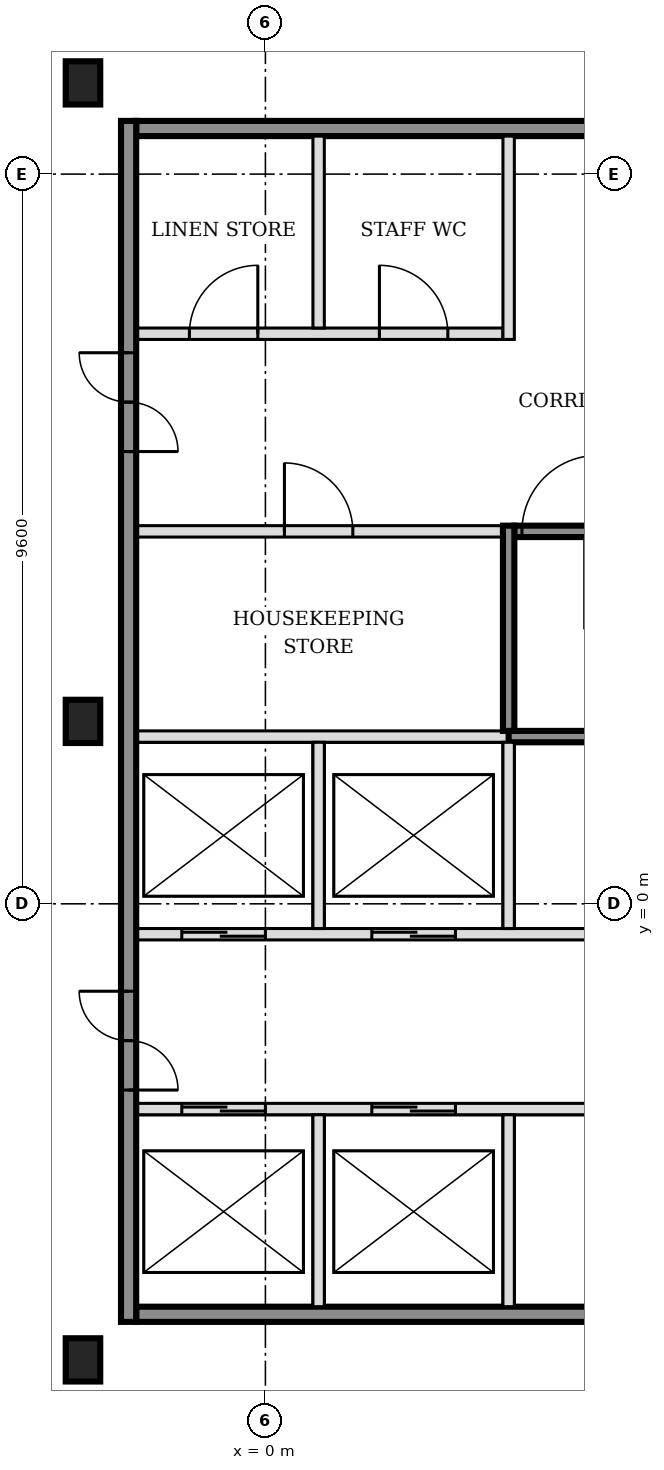
"""IFC4 building model, lengths in metres.
Left out: names, types, materials, properties, quantities, classifications, styles, units other than length and angle.
Written with IfcOpenShell. Run it as: python <this file> out.ifc"""

import sys

from ifc_helpers import new_model, si_unit, direction, frame, frame_2d, origin, origin_2d, place, context, subcontext, project, spatial, rectangle, i_section, extrude, element, fill, save


model = new_model("IFC4")
c1 = context("Model", 3, precision=1e-05, world=origin(), true_north=direction((0.0, 1.0)))
c2 = subcontext(c1, "Body", "Model", "MODEL_VIEW")
j1 = project(units=[si_unit("LENGTHUNIT", "METRE"), si_unit("PLANEANGLEUNIT", "RADIAN")], contexts=[c1])
p1 = place(None, origin())
s1 = spatial("IfcSite", under=j1, at=p1, CompositionType="ELEMENT")
p2 = place(p1, origin())
s2 = spatial("IfcBuilding", under=s1, at=p2, CompositionType="ELEMENT")
p3 = place(p2, frame((0.0, 0.0, 43.8)))
s3 = spatial("IfcBuildingStorey", under=s2, at=p3, CompositionType="ELEMENT", Elevation=43.8)
for number, where, z_axis, x_axis in (
    (1, (-2.4, -6.0, -0.15), (0.0, 0.0, 1.0), (1.0, 0.0, 0.0)),
    (2, (-2.4, 2.4, -0.15), (0.0, 0.0, 1.0), (1.0, 0.0, 0.0)),
    (3, (-2.4, 10.8, -0.15), (0.0, 0.0, 1.0), (1.0, 0.0, 0.0)),
):
    element("IfcColumn", number, at=place(p3, frame(where, z_axis=z_axis, x_axis=x_axis)), inside=s3, PredefinedType="COLUMN", context=c2, shape_type="SweptSolid", body=[
        extrude(i_section(OverallWidth=0.454, OverallDepth=0.569, WebThickness=0.078, FlangeThickness=0.125, FilletRadius=0.015, at=origin_2d()), origin(), (0.0, 0.0, 1.0), 3.6),
    ])
p4 = place(p3, frame((-1.7, -5.4, 0.0), z_axis=(0.0, 0.0, 1.0), x_axis=(1.0, 0.0, 0.0)))
e4 = element("IfcWall", 4, at=p4, inside=s3, PredefinedType="SOLIDWALL", context=c2, shape_type="SweptSolid", body=[
    extrude(rectangle(XDim=7.9, YDim=0.2, at=frame_2d((3.95, 0.0))), origin(), (0.0, 0.0, 1.0), 3.45),
])
p5 = place(p3, frame((-1.7, -2.7, 0.0), z_axis=(0.0, 0.0, 1.0), x_axis=(1.0, 0.0, 0.0)))
e5 = element("IfcWall", 5, at=p5, inside=s3, PredefinedType="SOLIDWALL", context=c2, shape_type="SweptSolid", body=[
    extrude(rectangle(XDim=7.9, YDim=0.15, at=frame_2d((3.95, 0.0))), origin(), (0.0, 0.0, 1.0), 3.45),
])
p6 = place(p5, frame((0.6, 0.0, 0.0)))
e6 = element("IfcOpeningElement", 6, at=p6, cuts=e5, PredefinedType="OPENING", context=c2, shape_type="SweptSolid", body=[
    extrude(rectangle(XDim=1.1, YDim=2.1, at=frame_2d((0.55, 1.05))), frame((0.0, 0.085, 0.0), z_axis=(0.0, -1.0, 0.0), x_axis=(1.0, 0.0, 0.0)), (0.0, 0.0, 1.0), 0.17),
])
p7 = place(p5, frame((3.1, 0.0, 0.0)))
e7 = element("IfcOpeningElement", 7, at=p7, cuts=e5, PredefinedType="OPENING", context=c2, shape_type="SweptSolid", body=[
    extrude(rectangle(XDim=1.1, YDim=2.1, at=frame_2d((0.55, 1.05))), frame((0.0, 0.085, 0.0), z_axis=(0.0, -1.0, 0.0), x_axis=(1.0, 0.0, 0.0)), (0.0, 0.0, 1.0), 0.17),
])
p8 = place(p3, frame((-1.7, -0.4, 0.0), z_axis=(0.0, 0.0, 1.0), x_axis=(1.0, 0.0, 0.0)))
e8 = element("IfcWall", 8, at=p8, inside=s3, PredefinedType="SOLIDWALL", context=c2, shape_type="SweptSolid", body=[
    extrude(rectangle(XDim=15.925, YDim=0.15, at=frame_2d((7.962, 0.0))), origin(), (0.0, 0.0, 1.0), 3.45),
])
p9 = place(p8, frame((0.6, 0.0, 0.0)))
e9 = element("IfcOpeningElement", 9, at=p9, cuts=e8, PredefinedType="OPENING", context=c2, shape_type="SweptSolid", body=[
    extrude(rectangle(XDim=1.1, YDim=2.1, at=frame_2d((0.55, 1.05))), frame((0.0, 0.085, 0.0), z_axis=(0.0, -1.0, 0.0), x_axis=(1.0, 0.0, 0.0)), (0.0, 0.0, 1.0), 0.17),
])
p10 = place(p8, frame((3.1, 0.0, 0.0)))
e10 = element("IfcOpeningElement", 10, at=p10, cuts=e8, PredefinedType="OPENING", context=c2, shape_type="SweptSolid", body=[
    extrude(rectangle(XDim=1.1, YDim=2.1, at=frame_2d((0.55, 1.05))), frame((0.0, 0.085, 0.0), z_axis=(0.0, -1.0, 0.0), x_axis=(1.0, 0.0, 0.0)), (0.0, 0.0, 1.0), 0.17),
])
p11 = place(p8, frame((11.575, 0.0, 0.0)))
e11 = element("IfcOpeningElement", 11, at=p11, cuts=e8, PredefinedType="OPENING", context=c2, shape_type="SweptSolid", body=[
    extrude(rectangle(XDim=1.2, YDim=2.1, at=frame_2d((0.6, 1.05))), frame((0.0, 0.085, 0.0), z_axis=(0.0, -1.0, 0.0), x_axis=(1.0, 0.0, 0.0)), (0.0, 0.0, 1.0), 0.17),
])
p12 = place(p8, frame((14.125, 0.0, 0.0)))
e12 = element("IfcOpeningElement", 12, at=p12, cuts=e8, PredefinedType="OPENING", context=c2, shape_type="SweptSolid", body=[
    extrude(rectangle(XDim=1.2, YDim=2.1, at=frame_2d((0.6, 1.05))), frame((0.0, 0.085, 0.0), z_axis=(0.0, -1.0, 0.0), x_axis=(1.0, 0.0, 0.0)), (0.0, 0.0, 1.0), 0.17),
])
p13 = place(p3, frame((-1.7, 2.2, 0.0), z_axis=(0.0, 0.0, 1.0), x_axis=(1.0, 0.0, 0.0)))
e13 = element("IfcWall", 13, at=p13, inside=s3, PredefinedType="SOLIDWALL", context=c2, shape_type="SweptSolid", body=[
    extrude(rectangle(XDim=4.9, YDim=0.15, at=frame_2d((2.45, 0.0))), origin(), (0.0, 0.0, 1.0), 3.45),
])
p14 = place(p3, frame((3.2, 2.2, 0.0), z_axis=(0.0, 0.0, 1.0), x_axis=(1.0, 0.0, 0.0)))
e14 = element("IfcWall", 14, at=p14, inside=s3, PredefinedType="SOLIDWALL", context=c2, shape_type="SweptSolid", body=[
    extrude(rectangle(XDim=6.5, YDim=0.15, at=frame_2d((3.25, 0.0))), origin(), (0.0, 0.0, 1.0), 3.45),
])
p15 = place(p3, frame((-1.7, 4.9, 0.0), z_axis=(0.0, 0.0, 1.0), x_axis=(1.0, 0.0, 0.0)))
e15 = element("IfcWall", 15, at=p15, inside=s3, PredefinedType="PARTITIONING", context=c2, shape_type="SweptSolid", body=[
    extrude(rectangle(XDim=4.825, YDim=0.15, at=frame_2d((2.413, 0.0))), origin(), (0.0, 0.0, 1.0), 3.45),
])
p16 = place(p15, frame((1.95, 0.0, 0.0)))
e16 = element("IfcOpeningElement", 16, at=p16, cuts=e15, PredefinedType="OPENING", context=c2, shape_type="SweptSolid", body=[
    extrude(rectangle(XDim=0.9, YDim=2.1, at=frame_2d((0.45, 1.05))), frame((0.0, 0.085, 0.0), z_axis=(0.0, -1.0, 0.0), x_axis=(1.0, 0.0, 0.0)), (0.0, 0.0, 1.0), 0.17),
])
p17 = place(p3, frame((3.275, 4.9, 0.0), z_axis=(0.0, 0.0, 1.0), x_axis=(1.0, 0.0, 0.0)))
e17 = element("IfcWall", 17, at=p17, inside=s3, PredefinedType="SOLIDWALL", context=c2, shape_type="SweptSolid", body=[
    extrude(rectangle(XDim=6.425, YDim=0.15, at=frame_2d((3.212, 0.0))), origin(), (0.0, 0.0, 1.0), 3.45),
])
p18 = place(p17, frame((0.1, 0.0, 0.0)))
e18 = element("IfcOpeningElement", 18, at=p18, cuts=e17, PredefinedType="OPENING", context=c2, shape_type="SweptSolid", body=[
    extrude(rectangle(XDim=1.0, YDim=2.1, at=frame_2d((0.5, 1.05))), frame((0.0, 0.085, 0.0), z_axis=(0.0, -1.0, 0.0), x_axis=(1.0, 0.0, 0.0)), (0.0, 0.0, 1.0), 0.17),
])
p19 = place(p3, frame((-1.7, 7.5, 0.0), z_axis=(0.0, 0.0, 1.0), x_axis=(1.0, 0.0, 0.0)))
e19 = element("IfcWall", 19, at=p19, inside=s3, PredefinedType="PARTITIONING", context=c2, shape_type="SweptSolid", body=[
    extrude(rectangle(XDim=4.825, YDim=0.15, at=frame_2d((2.413, 0.0))), origin(), (0.0, 0.0, 1.0), 3.45),
])
p20 = place(p19, frame((0.7, 0.0, 0.0)))
e20 = element("IfcOpeningElement", 20, at=p20, cuts=e19, PredefinedType="OPENING", context=c2, shape_type="SweptSolid", body=[
    extrude(rectangle(XDim=0.9, YDim=2.1, at=frame_2d((0.45, 1.05))), frame((0.0, 0.085, 0.0), z_axis=(0.0, -1.0, 0.0), x_axis=(1.0, 0.0, 0.0)), (0.0, 0.0, 1.0), 0.17),
])
p21 = place(p19, frame((3.2, 0.0, 0.0)))
e21 = element("IfcOpeningElement", 21, at=p21, cuts=e19, PredefinedType="OPENING", context=c2, shape_type="SweptSolid", body=[
    extrude(rectangle(XDim=0.9, YDim=2.1, at=frame_2d((0.45, 1.05))), frame((0.0, 0.085, 0.0), z_axis=(0.0, -1.0, 0.0), x_axis=(1.0, 0.0, 0.0)), (0.0, 0.0, 1.0), 0.17),
])
p22 = place(p3, frame((-1.7, 10.2, 0.0), z_axis=(0.0, 0.0, 1.0), x_axis=(1.0, 0.0, 0.0)))
e22 = element("IfcWall", 22, at=p22, inside=s3, PredefinedType="SOLIDWALL", context=c2, shape_type="SweptSolid", body=[
    extrude(rectangle(XDim=7.9, YDim=0.2, at=frame_2d((3.95, 0.0))), origin(), (0.0, 0.0, 1.0), 3.45),
])
p23 = place(p3, frame((-1.8, -5.5, 0.0), z_axis=(0.0, 0.0, 1.0), x_axis=(0.0, 1.0, 0.0)))
e23 = element("IfcWall", 23, at=p23, inside=s3, PredefinedType="SOLIDWALL", context=c2, shape_type="SweptSolid", body=[
    extrude(rectangle(XDim=15.8, YDim=0.2, at=frame_2d((7.9, 0.0))), origin(), (0.0, 0.0, 1.0), 3.45),
])
p24 = place(p23, frame((3.05, 0.0, 0.0)))
e24 = element("IfcOpeningElement", 24, at=p24, cuts=e23, PredefinedType="OPENING", context=c2, shape_type="SweptSolid", body=[
    extrude(rectangle(XDim=1.3, YDim=2.1, at=frame_2d((0.65, 1.05))), frame((0.0, 0.11, 0.0), z_axis=(0.0, -1.0, 0.0), x_axis=(1.0, 0.0, 0.0)), (0.0, 0.0, 1.0), 0.22),
])
p25 = place(p23, frame((11.45, 0.0, 0.0)))
e25 = element("IfcOpeningElement", 25, at=p25, cuts=e23, PredefinedType="OPENING", context=c2, shape_type="SweptSolid", body=[
    extrude(rectangle(XDim=1.3, YDim=2.1, at=frame_2d((0.65, 1.05))), frame((0.0, 0.11, 0.0), z_axis=(0.0, -1.0, 0.0), x_axis=(1.0, 0.0, 0.0)), (0.0, 0.0, 1.0), 0.22),
])
p26 = place(p3, frame((0.7, -5.3, 0.0), z_axis=(0.0, 0.0, 1.0), x_axis=(0.0, 1.0, 0.0)))
e26 = element("IfcWall", 26, at=p26, inside=s3, PredefinedType="SOLIDWALL", context=c2, shape_type="SweptSolid", body=[
    extrude(rectangle(XDim=2.525, YDim=0.15, at=frame_2d((1.263, 0.0))), origin(), (0.0, 0.0, 1.0), 3.45),
])
p27 = place(p3, frame((0.7, -0.325, 0.0), z_axis=(0.0, 0.0, 1.0), x_axis=(0.0, 1.0, 0.0)))
e27 = element("IfcWall", 27, at=p27, inside=s3, PredefinedType="SOLIDWALL", context=c2, shape_type="SweptSolid", body=[
    extrude(rectangle(XDim=2.45, YDim=0.15, at=frame_2d((1.225, 0.0))), origin(), (0.0, 0.0, 1.0), 3.45),
])
p28 = place(p3, frame((0.7, 7.575, 0.0), z_axis=(0.0, 0.0, 1.0), x_axis=(0.0, 1.0, 0.0)))
e28 = element("IfcWall", 28, at=p28, inside=s3, PredefinedType="PARTITIONING", context=c2, shape_type="SweptSolid", body=[
    extrude(rectangle(XDim=2.525, YDim=0.15, at=frame_2d((1.263, 0.0))), origin(), (0.0, 0.0, 1.0), 3.45),
])
p29 = place(p3, frame((3.2, -5.3, 0.0), z_axis=(0.0, 0.0, 1.0), x_axis=(0.0, 1.0, 0.0)))
e29 = element("IfcWall", 29, at=p29, inside=s3, PredefinedType="SOLIDWALL", context=c2, shape_type="SweptSolid", body=[
    extrude(rectangle(XDim=2.525, YDim=0.15, at=frame_2d((1.263, 0.0))), origin(), (0.0, 0.0, 1.0), 3.45),
])
p30 = place(p3, frame((3.2, -0.325, 0.0), z_axis=(0.0, 0.0, 1.0), x_axis=(0.0, 1.0, 0.0)))
e30 = element("IfcWall", 30, at=p30, inside=s3, PredefinedType="SOLIDWALL", context=c2, shape_type="SweptSolid", body=[
    extrude(rectangle(XDim=2.45, YDim=0.15, at=frame_2d((1.225, 0.0))), origin(), (0.0, 0.0, 1.0), 3.45),
])
p31 = place(p3, frame((3.2, 2.275, 0.0), z_axis=(0.0, 0.0, 1.0), x_axis=(0.0, 1.0, 0.0)))
e31 = element("IfcWall", 31, at=p31, inside=s3, PredefinedType="SOLIDWALL", context=c2, shape_type="SweptSolid", body=[
    extrude(rectangle(XDim=2.7, YDim=0.15, at=frame_2d((1.35, 0.0))), origin(), (0.0, 0.0, 1.0), 3.45),
])
p32 = place(p3, frame((3.2, 7.425, 0.0), z_axis=(0.0, 0.0, 1.0), x_axis=(0.0, 1.0, 0.0)))
e32 = element("IfcWall", 32, at=p32, inside=s3, PredefinedType="PARTITIONING", context=c2, shape_type="SweptSolid", body=[
    extrude(rectangle(XDim=2.675, YDim=0.15, at=frame_2d((1.337, 0.0))), origin(), (0.0, 0.0, 1.0), 3.45),
])
p33 = place(p6, origin())
e33 = element("IfcDoor", 33, at=p33, inside=s3, OperationType="DOUBLE_DOOR_SLIDING", PredefinedType="DOOR", context=c2, shape_type="SweptSolid", body=[
    extrude(rectangle(XDim=1.1, YDim=2.1, at=frame_2d((0.55, 1.05))), frame((0.0, 0.025, 0.0), z_axis=(0.0, -1.0, 0.0), x_axis=(1.0, 0.0, 0.0)), (0.0, 0.0, 1.0), 0.05),
])
fill(e6, e33)
p34 = place(p7, origin())
e34 = element("IfcDoor", 34, at=p34, inside=s3, OperationType="DOUBLE_DOOR_SLIDING", PredefinedType="DOOR", context=c2, shape_type="SweptSolid", body=[
    extrude(rectangle(XDim=1.1, YDim=2.1, at=frame_2d((0.55, 1.05))), frame((0.0, 0.025, 0.0), z_axis=(0.0, -1.0, 0.0), x_axis=(1.0, 0.0, 0.0)), (0.0, 0.0, 1.0), 0.05),
])
fill(e7, e34)
p35 = place(p9, origin())
e35 = element("IfcDoor", 35, at=p35, inside=s3, OperationType="DOUBLE_DOOR_SLIDING", PredefinedType="DOOR", context=c2, shape_type="SweptSolid", body=[
    extrude(rectangle(XDim=1.1, YDim=2.1, at=frame_2d((0.55, 1.05))), frame((0.0, 0.025, 0.0), z_axis=(0.0, -1.0, 0.0), x_axis=(1.0, 0.0, 0.0)), (0.0, 0.0, 1.0), 0.05),
])
fill(e9, e35)
p36 = place(p10, origin())
e36 = element("IfcDoor", 36, at=p36, inside=s3, OperationType="DOUBLE_DOOR_SLIDING", PredefinedType="DOOR", context=c2, shape_type="SweptSolid", body=[
    extrude(rectangle(XDim=1.1, YDim=2.1, at=frame_2d((0.55, 1.05))), frame((0.0, 0.025, 0.0), z_axis=(0.0, -1.0, 0.0), x_axis=(1.0, 0.0, 0.0)), (0.0, 0.0, 1.0), 0.05),
])
fill(e10, e36)
p37 = place(p18, origin())
e37 = element("IfcDoor", 37, at=p37, inside=s3, OperationType="SINGLE_SWING_RIGHT", PredefinedType="DOOR", context=c2, shape_type="SweptSolid", body=[
    extrude(rectangle(XDim=1.0, YDim=2.1, at=frame_2d((0.5, 1.05))), frame((0.0, 0.025, 0.0), z_axis=(0.0, -1.0, 0.0), x_axis=(1.0, 0.0, 0.0)), (0.0, 0.0, 1.0), 0.05),
])
fill(e18, e37)
p38 = place(p24, origin())
e38 = element("IfcDoor", 38, at=p38, inside=s3, OperationType="DOUBLE_DOOR_SINGLE_SWING", PredefinedType="DOOR", context=c2, shape_type="SweptSolid", body=[
    extrude(rectangle(XDim=1.3, YDim=2.1, at=frame_2d((0.65, 1.05))), frame((0.0, 0.025, 0.0), z_axis=(0.0, -1.0, 0.0), x_axis=(1.0, 0.0, 0.0)), (0.0, 0.0, 1.0), 0.05),
])
fill(e24, e38)
p39 = place(p25, origin())
e39 = element("IfcDoor", 39, at=p39, inside=s3, OperationType="DOUBLE_DOOR_SINGLE_SWING", PredefinedType="DOOR", context=c2, shape_type="SweptSolid", body=[
    extrude(rectangle(XDim=1.3, YDim=2.1, at=frame_2d((0.65, 1.05))), frame((0.0, 0.025, 0.0), z_axis=(0.0, -1.0, 0.0), x_axis=(1.0, 0.0, 0.0)), (0.0, 0.0, 1.0), 0.05),
])
fill(e25, e39)
p40 = place(p16, origin())
e40 = element("IfcDoor", 40, at=p40, inside=s3, OperationType="SINGLE_SWING_LEFT", PredefinedType="DOOR", context=c2, shape_type="SweptSolid", body=[
    extrude(rectangle(XDim=0.9, YDim=2.1, at=frame_2d((0.45, 1.05))), frame((0.0, 0.025, 0.0), z_axis=(0.0, -1.0, 0.0), x_axis=(1.0, 0.0, 0.0)), (0.0, 0.0, 1.0), 0.05),
])
fill(e16, e40)
p41 = place(p20, origin())
e41 = element("IfcDoor", 41, at=p41, inside=s3, OperationType="SINGLE_SWING_RIGHT", PredefinedType="DOOR", context=c2, shape_type="SweptSolid", body=[
    extrude(rectangle(XDim=0.9, YDim=2.1, at=frame_2d((0.45, 1.05))), frame((0.0, 0.025, 0.0), z_axis=(0.0, -1.0, 0.0), x_axis=(1.0, 0.0, 0.0)), (0.0, 0.0, 1.0), 0.05),
])
fill(e20, e41)
p42 = place(p21, origin())
e42 = element("IfcDoor", 42, at=p42, inside=s3, OperationType="SINGLE_SWING_LEFT", PredefinedType="DOOR", context=c2, shape_type="SweptSolid", body=[
    extrude(rectangle(XDim=0.9, YDim=2.1, at=frame_2d((0.45, 1.05))), frame((0.0, 0.025, 0.0), z_axis=(0.0, -1.0, 0.0), x_axis=(1.0, 0.0, 0.0)), (0.0, 0.0, 1.0), 0.05),
])
fill(e21, e42)
save(model, sys.argv[1])
